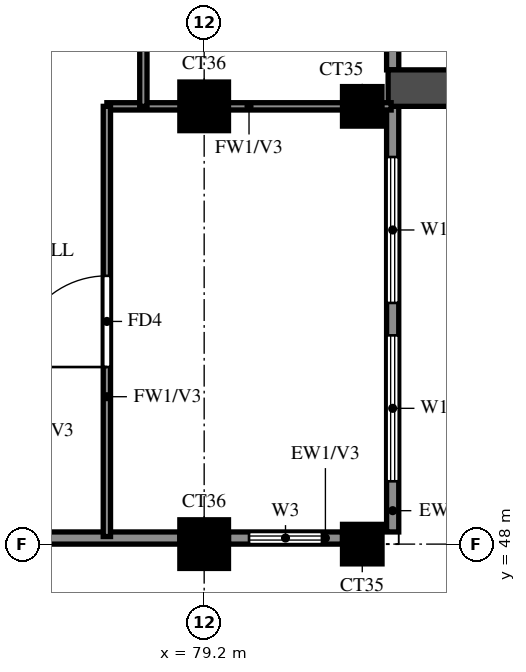
"""IFC4 building model, lengths in metres.
Left out: names, types, materials, properties, quantities, classifications, styles, units other than length and angle.
Written with IfcOpenShell. Run it as: python <this file> out.ifc"""

import sys

from ifc_helpers import new_model, si_unit, direction, frame, frame_2d, origin, origin_2d, place, context, subcontext, project, spatial, rectangle, extrude, source, transform, mapped, element, fill, save


model = new_model("IFC4")
c1 = context("Model", 3, precision=1e-05, world=origin(), true_north=direction((0.0, 1.0)))
c2 = subcontext(c1, "Body", "Model", "MODEL_VIEW")
j1 = project(units=[si_unit("LENGTHUNIT", "METRE"), si_unit("PLANEANGLEUNIT", "RADIAN")], contexts=[c1])
p1 = place(None, origin())
s1 = spatial("IfcSite", under=j1, at=p1, CompositionType="ELEMENT")
p2 = place(p1, origin())
s2 = spatial("IfcBuilding", under=s1, at=p2, CompositionType="ELEMENT")
p3 = place(p2, frame((0.0, 0.0, 239.5)))
s3 = spatial("IfcBuildingStorey", under=s2, at=p3, CompositionType="ELEMENT", Elevation=239.5)
m1 = source(origin(), c2, "Body", "SweptSolid", [
    extrude(rectangle(XDim=0.8, YDim=0.8, at=origin_2d()), origin(), (0.0, 0.0, 1.0), 3.22),
])
p4 = place(p3, frame((79.2, 48.0, 0.0), z_axis=(0.0, 0.0, 1.0), x_axis=(1.0, 0.0, 0.0)))
e1 = element("IfcColumn", 1, at=p4, inside=s3, PredefinedType="COLUMN", context=c2, shape_type="MappedRepresentation", body=[
    mapped(m1, transform((0.0, 0.0, 0.0))),
])
m2 = source(origin(), c2, "Body", "SweptSolid", [
    extrude(rectangle(XDim=0.65, YDim=0.65, at=origin_2d()), origin(), (0.0, 0.0, 1.0), 3.22),
])
p5 = place(p3, frame((81.8, 48.0, 0.0), z_axis=(0.0, 0.0, 1.0), x_axis=(1.0, 0.0, 0.0)))
e2 = element("IfcColumn", 2, at=p5, inside=s3, PredefinedType="COLUMN", context=c2, shape_type="MappedRepresentation", body=[
    mapped(m2, transform((0.0, 0.0, 0.0))),
])
p6 = place(p3, frame((79.2, 55.2, 0.0), z_axis=(0.0, 0.0, 1.0), x_axis=(1.0, 0.0, 0.0)))
e3 = element("IfcColumn", 3, at=p6, inside=s3, PredefinedType="COLUMN", context=c2, shape_type="MappedRepresentation", body=[
    mapped(m1, transform((0.0, 0.0, 0.0))),
])
p7 = place(p3, frame((81.8, 55.2, 0.0), z_axis=(0.0, 0.0, 1.0), x_axis=(1.0, 0.0, 0.0)))
e4 = element("IfcColumn", 4, at=p7, inside=s3, PredefinedType="COLUMN", context=c2, shape_type="MappedRepresentation", body=[
    mapped(m2, transform((0.0, 0.0, 0.0))),
])
p8 = place(p3, frame((81.907, 39.87, 0.0), z_axis=(0.0, 0.0, 1.0), x_axis=(-0.777936274417, 0.62834318087, 0.0)))
e5 = element("IfcWall", 5, at=p8, inside=s3, PredefinedType="SOLIDWALL", context=c2, shape_type="SweptSolid", body=[
    extrude(rectangle(XDim=13.099, YDim=0.2, at=frame_2d((6.549, 0.0))), origin(), (0.0, 0.0, 1.0), 3.22),
])
p9 = place(p8, frame((9.938, 0.0, 1.5)))
e6 = element("IfcOpeningElement", 6, at=p9, cuts=e5, PredefinedType="OPENING", context=c2, shape_type="SweptSolid", body=[
    extrude(rectangle(XDim=0.9, YDim=0.9, at=frame_2d((0.45, 0.45))), frame((0.0, 0.11, 0.0), z_axis=(0.0, -1.0, 0.0), x_axis=(1.0, 0.0, 0.0)), (0.0, 0.0, 1.0), 0.22),
])
p10 = place(p3, frame((71.987, 48.1, 0.0), z_axis=(0.0, 0.0, 1.0), x_axis=(1.0, 0.0, 0.0)))
e7 = element("IfcWall", 7, at=p10, inside=s3, PredefinedType="SOLIDWALL", context=c2, shape_type="SweptSolid", body=[
    extrude(rectangle(XDim=6.813, YDim=0.2, at=frame_2d((3.406, 0.0))), origin(), (0.0, 0.0, 1.0), 3.22),
])
p11 = place(p3, frame((79.6, 48.1, 0.0), z_axis=(0.0, 0.0, 1.0), x_axis=(1.0, 0.0, 0.0)))
e8 = element("IfcWall", 8, at=p11, inside=s3, PredefinedType="SOLIDWALL", context=c2, shape_type="SweptSolid", body=[
    extrude(rectangle(XDim=1.875, YDim=0.2, at=frame_2d((0.938, 0.0))), origin(), (0.0, 0.0, 1.0), 3.22),
])
p12 = place(p11, frame((0.337, 0.0, 0.6)))
e9 = element("IfcOpeningElement", 9, at=p12, cuts=e8, PredefinedType="OPENING", context=c2, shape_type="SweptSolid", body=[
    extrude(rectangle(XDim=1.2, YDim=2.4, at=frame_2d((0.6, 1.2))), frame((0.0, 0.11, 0.0), z_axis=(0.0, -1.0, 0.0), x_axis=(1.0, 0.0, 0.0)), (0.0, 0.0, 1.0), 0.22),
])
p13 = place(p3, frame((82.3, 48.2, 0.0), z_axis=(0.0, 0.0, 1.0), x_axis=(0.0, 1.0, 0.0)))
e10 = element("IfcWall", 10, at=p13, inside=s3, PredefinedType="SOLIDWALL", context=c2, shape_type="SweptSolid", body=[
    extrude(rectangle(XDim=7.0, YDim=0.2, at=frame_2d((3.5, 0.0))), origin(), (0.0, 0.0, 1.0), 3.22),
])
p14 = place(p13, frame((0.833, 0.0, 0.6)))
e11 = element("IfcOpeningElement", 11, at=p14, cuts=e10, PredefinedType="OPENING", context=c2, shape_type="SweptSolid", body=[
    extrude(rectangle(XDim=2.4, YDim=2.4, at=frame_2d((1.2, 1.2))), frame((0.0, 0.11, 0.0), z_axis=(0.0, -1.0, 0.0), x_axis=(1.0, 0.0, 0.0)), (0.0, 0.0, 1.0), 0.22),
])
p15 = place(p13, frame((3.767, 0.0, 0.6)))
e12 = element("IfcOpeningElement", 12, at=p15, cuts=e10, PredefinedType="OPENING", context=c2, shape_type="SweptSolid", body=[
    extrude(rectangle(XDim=2.4, YDim=2.4, at=frame_2d((1.2, 1.2))), frame((0.0, 0.11, 0.0), z_axis=(0.0, -1.0, 0.0), x_axis=(1.0, 0.0, 0.0)), (0.0, 0.0, 1.0), 0.22),
])
p16 = place(p3, frame((82.3, 55.8, 0.0), z_axis=(0.0, 0.0, 1.0), x_axis=(0.0, 1.0, 0.0)))
e13 = element("IfcWall", 13, at=p16, inside=s3, PredefinedType="SOLIDWALL", context=c2, shape_type="SweptSolid", body=[
    extrude(rectangle(XDim=6.0, YDim=0.2, at=frame_2d((3.0, 0.0))), origin(), (0.0, 0.0, 1.0), 3.22),
])
p17 = place(p16, frame((3.3, 0.0, 0.0)))
e14 = element("IfcOpeningElement", 14, at=p17, cuts=e13, PredefinedType="OPENING", context=c2, shape_type="SweptSolid", body=[
    extrude(rectangle(XDim=1.8, YDim=2.4, at=frame_2d((0.9, 1.2))), frame((0.0, 0.11, 0.0), z_axis=(0.0, -1.0, 0.0), x_axis=(1.0, 0.0, 0.0)), (0.0, 0.0, 1.0), 0.22),
])
p18 = place(p16, frame((1.15, 0.0, 1.5)))
e15 = element("IfcOpeningElement", 15, at=p18, cuts=e13, PredefinedType="OPENING", context=c2, shape_type="SweptSolid", body=[
    extrude(rectangle(XDim=0.9, YDim=0.9, at=frame_2d((0.45, 0.45))), frame((0.0, 0.11, 0.0), z_axis=(0.0, -1.0, 0.0), x_axis=(1.0, 0.0, 0.0)), (0.0, 0.0, 1.0), 0.22),
])
p19 = place(p3, frame((82.225, 55.5, 0.0), z_axis=(0.0, 0.0, 1.0), x_axis=(1.0, 0.0, 0.0)))
e16 = element("IfcWall", 16, at=p19, inside=s3, PredefinedType="SOLIDWALL", context=c2, shape_type="SweptSolid", body=[
    extrude(rectangle(XDim=2.875, YDim=0.6, at=frame_2d((1.438, 0.0))), origin(), (0.0, 0.0, 1.0), 2.85),
])
p20 = place(p3, frame((77.6, 55.2, 0.0), z_axis=(0.0, 0.0, 1.0), x_axis=(1.0, 0.0, 0.0)))
e17 = element("IfcWall", 17, at=p20, inside=s3, PredefinedType="PARTITIONING", context=c2, shape_type="SweptSolid", body=[
    extrude(rectangle(XDim=4.675, YDim=0.12, at=frame_2d((2.337, 0.0))), origin(), (0.0, 0.0, 1.0), 3.22),
])
p21 = place(p3, frame((77.6, 48.125, 0.0), z_axis=(0.0, 0.0, 1.0), x_axis=(0.0, 1.0, 0.0)))
e18 = element("IfcWall", 18, at=p21, inside=s3, PredefinedType="PARTITIONING", context=c2, shape_type="SweptSolid", body=[
    extrude(rectangle(XDim=7.075, YDim=0.12, at=frame_2d((3.538, 0.0))), origin(), (0.0, 0.0, 1.0), 3.22),
])
p22 = place(p21, frame((2.788, 0.0, 0.0)))
e19 = element("IfcOpeningElement", 19, at=p22, cuts=e18, PredefinedType="OPENING", context=c2, shape_type="SweptSolid", body=[
    extrude(rectangle(XDim=1.5, YDim=2.1, at=frame_2d((0.75, 1.05))), frame((0.0, 0.07, 0.0), z_axis=(0.0, -1.0, 0.0), x_axis=(1.0, 0.0, 0.0)), (0.0, 0.0, 1.0), 0.14),
])
p23 = place(p3, frame((78.2, 55.2, 0.0), z_axis=(0.0, 0.0, 1.0), x_axis=(0.0, 1.0, 0.0)))
e20 = element("IfcWall", 20, at=p23, inside=s3, PredefinedType="PARTITIONING", context=c2, shape_type="SweptSolid", body=[
    extrude(rectangle(XDim=3.6, YDim=0.12, at=frame_2d((1.8, 0.0))), origin(), (0.0, 0.0, 1.0), 3.22),
])
p24 = place(p12, origin())
e21 = element("IfcWindow", 21, at=p24, inside=s3, PartitioningType="SINGLE_PANEL", PredefinedType="WINDOW", context=c2, shape_type="SweptSolid", body=[
    extrude(rectangle(XDim=1.2, YDim=2.4, at=frame_2d((0.6, 1.2))), frame((0.0, 0.03, 0.0), z_axis=(0.0, -1.0, 0.0), x_axis=(1.0, 0.0, 0.0)), (0.0, 0.0, 1.0), 0.06),
])
fill(e9, e21)
p25 = place(p14, origin())
e22 = element("IfcWindow", 22, at=p25, inside=s3, PartitioningType="DOUBLE_PANEL_VERTICAL", PredefinedType="WINDOW", context=c2, shape_type="SweptSolid", body=[
    extrude(rectangle(XDim=2.4, YDim=2.4, at=frame_2d((1.2, 1.2))), frame((0.0, 0.03, 0.0), z_axis=(0.0, -1.0, 0.0), x_axis=(1.0, 0.0, 0.0)), (0.0, 0.0, 1.0), 0.06),
])
fill(e11, e22)
p26 = place(p15, origin())
e23 = element("IfcWindow", 23, at=p26, inside=s3, PartitioningType="DOUBLE_PANEL_VERTICAL", PredefinedType="WINDOW", context=c2, shape_type="SweptSolid", body=[
    extrude(rectangle(XDim=2.4, YDim=2.4, at=frame_2d((1.2, 1.2))), frame((0.0, 0.03, 0.0), z_axis=(0.0, -1.0, 0.0), x_axis=(1.0, 0.0, 0.0)), (0.0, 0.0, 1.0), 0.06),
])
fill(e12, e23)
p27 = place(p22, origin())
e24 = element("IfcDoor", 24, at=p27, inside=s3, OperationType="SINGLE_SWING_RIGHT", PredefinedType="DOOR", context=c2, shape_type="SweptSolid", body=[
    extrude(rectangle(XDim=1.5, YDim=2.1, at=frame_2d((0.75, 1.05))), frame((0.0, 0.025, 0.0), z_axis=(0.0, -1.0, 0.0), x_axis=(1.0, 0.0, 0.0)), (0.0, 0.0, 1.0), 0.05),
])
fill(e19, e24)
save(model, sys.argv[1])
